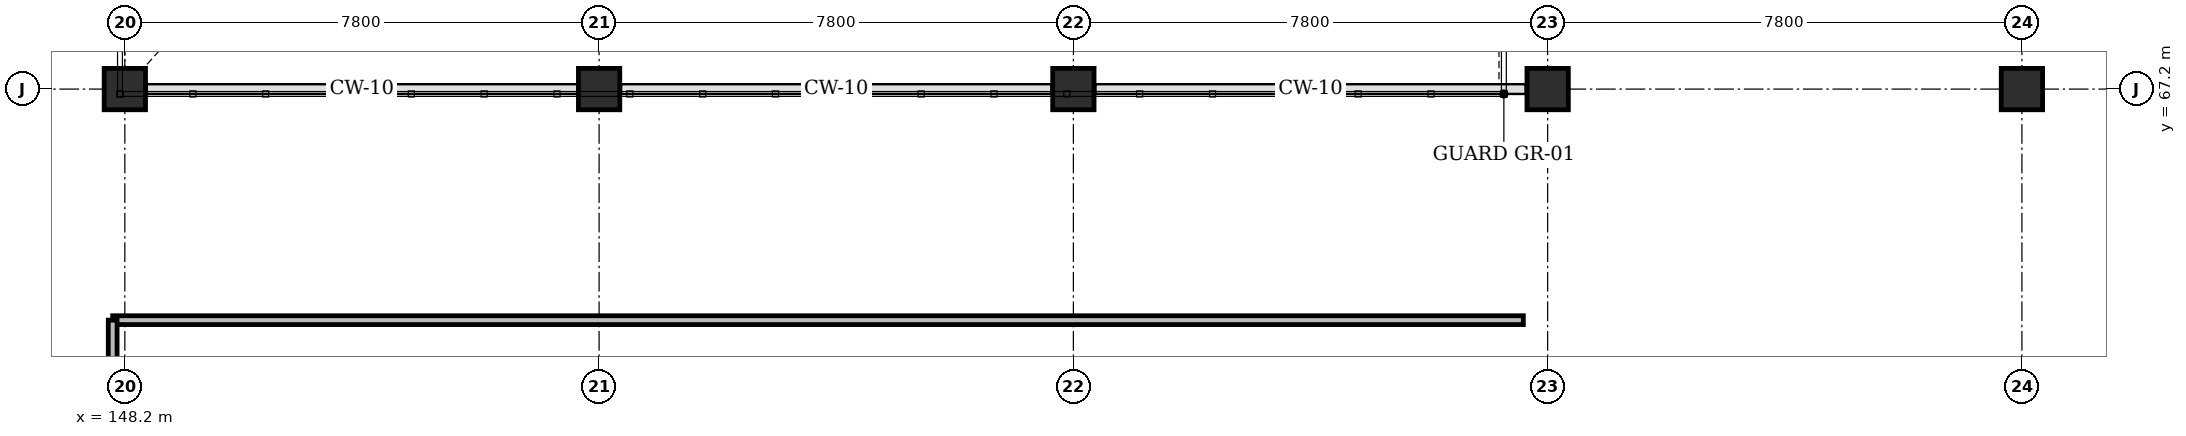
"""IFC4 building model, lengths in metres.
Left out: names, types, materials, properties, quantities, classifications, styles, units other than length and angle.
Written with IfcOpenShell. Run it as: python <this file> out.ifc"""

import sys

from ifc_helpers import new_model, si_unit, direction, frame, frame_2d, origin, origin_2d, place, context, subcontext, project, spatial, rectangle, extrude, element, save


model = new_model("IFC4")
c1 = context("Model", 3, precision=1e-05, world=origin(), true_north=direction((0.0, 1.0)))
c2 = subcontext(c1, "Body", "Model", "MODEL_VIEW")
j1 = project(units=[si_unit("LENGTHUNIT", "METRE"), si_unit("PLANEANGLEUNIT", "RADIAN")], contexts=[c1])
p1 = place(None, origin())
s1 = spatial("IfcSite", under=j1, at=p1, CompositionType="ELEMENT")
p2 = place(p1, origin())
s2 = spatial("IfcBuilding", under=s1, at=p2, CompositionType="ELEMENT")
p3 = place(p2, frame((0.0, 0.0, 4.8)))
s3 = spatial("IfcBuildingStorey", under=s2, at=p3, CompositionType="ELEMENT", Elevation=4.8)
for number, where, z_axis, x_axis in (
    (1, (148.2, 67.2, 0.0), (0.0, 0.0, 1.0), (1.0, 0.0, 0.0)),
    (2, (156.0, 67.2, 0.0), (0.0, 0.0, 1.0), (1.0, 0.0, 0.0)),
    (3, (163.8, 67.2, 0.0), (0.0, 0.0, 1.0), (1.0, 0.0, 0.0)),
    (4, (171.6, 67.2, 0.0), (0.0, 0.0, 1.0), (1.0, 0.0, 0.0)),
    (5, (179.4, 67.2, 0.0), (0.0, 0.0, 1.0), (1.0, 0.0, 0.0)),
):
    element("IfcColumn", number, at=place(p3, frame(where, z_axis=z_axis, x_axis=x_axis)), inside=s3, PredefinedType="COLUMN", context=c2, shape_type="SweptSolid", body=[
        extrude(rectangle(XDim=0.68, YDim=0.68, at=origin_2d()), origin(), (0.0, 0.0, 1.0), 4.8),
    ])
p4 = place(p3, frame((148.0, 63.4, 0.0), z_axis=(0.0, 0.0, 1.0), x_axis=(1.0, 0.0, 0.0)))
e6 = element("IfcWall", 6, at=p4, inside=s3, PredefinedType="PARTITIONING", context=c2, shape_type="SweptSolid", body=[
    extrude(rectangle(XDim=23.2, YDim=0.145, at=frame_2d((11.6, 0.0))), origin(), (0.0, 0.0, 1.0), 4.46),
])
p5 = place(p3, frame((148.0, 42.4, 0.0), z_axis=(0.0, 0.0, 1.0), x_axis=(0.0, 1.0, 0.0)))
e7 = element("IfcWall", 7, at=p5, inside=s3, PredefinedType="PARTITIONING", context=c2, shape_type="SweptSolid", body=[
    extrude(rectangle(XDim=21.0, YDim=0.145, at=frame_2d((10.5, 0.0))), origin(), (0.0, 0.0, 1.0), 3.665),
])
p6 = place(p5, frame((9.95, 0.0, 0.0)))
e8 = element("IfcOpeningElement", 8, at=p6, cuts=e7, PredefinedType="OPENING", context=c2, shape_type="SweptSolid", body=[
    extrude(rectangle(XDim=1.1, YDim=2.15, at=frame_2d((0.55, 1.075))), frame((0.0, 0.083, 0.0), z_axis=(0.0, -1.0, 0.0), x_axis=(1.0, 0.0, 0.0)), (0.0, 0.0, 1.0), 0.165),
])
save(model, sys.argv[1])
